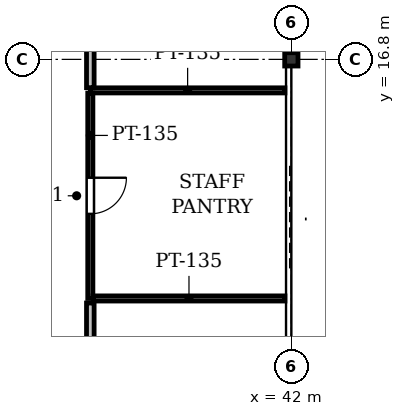
"""IFC4 building model, lengths in metres.
Left out: names, types, materials, properties, quantities, classifications, styles, units other than length and angle.
Written with IfcOpenShell. Run it as: python <this file> out.ifc"""

import sys

from ifc_helpers import new_model, si_unit, direction, frame, frame_2d, origin, origin_2d, place, context, subcontext, project, spatial, rectangle, i_section, extrude, element, fill, save


model = new_model("IFC4")
c1 = context("Model", 3, precision=1e-05, world=origin(), true_north=direction((0.0, 1.0)))
c2 = subcontext(c1, "Body", "Model", "MODEL_VIEW")
j1 = project(units=[si_unit("LENGTHUNIT", "METRE"), si_unit("PLANEANGLEUNIT", "RADIAN")], contexts=[c1])
p1 = place(None, origin())
s1 = spatial("IfcSite", under=j1, at=p1, CompositionType="ELEMENT")
p2 = place(p1, origin())
s2 = spatial("IfcBuilding", under=s1, at=p2, CompositionType="ELEMENT")
p3 = place(p2, frame((0.0, 0.0, 220.6)))
s3 = spatial("IfcBuildingStorey", under=s2, at=p3, CompositionType="ELEMENT", Elevation=220.6)
p4 = place(p3, frame((42.0, 16.8, 0.0), z_axis=(0.0, 0.0, 1.0), x_axis=(1.0, 0.0, 0.0)))
e1 = element("IfcColumn", 1, at=p4, inside=s3, PredefinedType="COLUMN", context=c2, shape_type="SweptSolid", body=[
    extrude(i_section(OverallWidth=0.35, OverallDepth=0.35, WebThickness=0.02, FlangeThickness=0.032, at=origin_2d()), origin(), (0.0, 0.0, 1.0), 4.1),
])
p5 = place(p3, frame((41.831, 15.984, 0.0), z_axis=(0.0, 0.0, 1.0), x_axis=(-1.0, 0.0, 0.0)))
e2 = element("IfcWall", 2, at=p5, inside=s3, PredefinedType="PARTITIONING", context=c2, shape_type="SweptSolid", body=[
    extrude(rectangle(XDim=5.121, YDim=0.135, at=frame_2d((2.561, 0.0))), origin(), (0.0, 0.0, 1.0), 3.518),
])
p6 = place(p3, frame((36.71, 15.913, 0.0), z_axis=(0.0, 0.0, 1.0), x_axis=(0.0, -1.0, 0.0)))
e3 = element("IfcWall", 3, at=p6, inside=s3, PredefinedType="PARTITIONING", context=c2, shape_type="SweptSolid", body=[
    extrude(rectangle(XDim=5.404, YDim=0.135, at=frame_2d((2.702, 0.0))), origin(), (0.0, 0.0, 1.0), 3.825),
])
p7 = place(p6, frame((2.227, 0.0, 0.0)))
e4 = element("IfcOpeningElement", 4, at=p7, cuts=e3, PredefinedType="OPENING", context=c2, shape_type="SweptSolid", body=[
    extrude(rectangle(XDim=0.95, YDim=2.15, at=frame_2d((0.475, 1.075))), frame((0.0, 0.077, 0.0), z_axis=(0.0, -1.0, 0.0), x_axis=(1.0, 0.0, 0.0)), (0.0, 0.0, 1.0), 0.155),
])
p8 = place(p3, frame((36.781, 10.509, 0.0), z_axis=(0.0, 0.0, 1.0), x_axis=(1.0, 0.0, 0.0)))
e5 = element("IfcWall", 5, at=p8, inside=s3, PredefinedType="PARTITIONING", context=c2, shape_type="SweptSolid", body=[
    extrude(rectangle(XDim=5.05, YDim=0.135, at=frame_2d((2.525, 0.0))), origin(), (0.0, 0.0, 1.0), 3.518),
])
p9 = place(p3, frame((36.71, 10.389, 0.0), z_axis=(0.0, 0.0, 1.0), x_axis=(0.0, -1.0, 0.0)))
e6 = element("IfcWall", 6, at=p9, inside=s3, PredefinedType="PARTITIONING", context=c2, shape_type="SweptSolid", body=[
    extrude(rectangle(XDim=4.989, YDim=0.2, at=frame_2d((2.495, 0.0))), origin(), (0.0, 0.0, 1.0), 3.365),
])
p10 = place(p9, frame((1.994, 0.0, 0.0)))
e7 = element("IfcOpeningElement", 7, at=p10, cuts=e6, PredefinedType="OPENING", context=c2, shape_type="SweptSolid", body=[
    extrude(rectangle(XDim=1.0, YDim=2.15, at=frame_2d((0.5, 1.075))), frame((0.0, 0.11, 0.0), z_axis=(0.0, -1.0, 0.0), x_axis=(1.0, 0.0, 0.0)), (0.0, 0.0, 1.0), 0.22),
])
p11 = place(p3, frame((36.71, 19.9, 0.0), z_axis=(0.0, 0.0, 1.0), x_axis=(0.0, -1.0, 0.0)))
e8 = element("IfcWall", 8, at=p11, inside=s3, PredefinedType="PARTITIONING", context=c2, shape_type="SweptSolid", body=[
    extrude(rectangle(XDim=3.844, YDim=0.2, at=frame_2d((1.922, 0.0))), origin(), (0.0, 0.0, 1.0), 3.365),
])
p12 = place(p7, origin())
e9 = element("IfcDoor", 9, at=p12, inside=s3, OperationType="SINGLE_SWING_LEFT", PredefinedType="DOOR", context=c2, shape_type="SweptSolid", body=[
    extrude(rectangle(XDim=0.95, YDim=2.15, at=frame_2d((0.475, 1.075))), frame((0.0, 0.025, 0.0), z_axis=(0.0, -1.0, 0.0), x_axis=(1.0, 0.0, 0.0)), (0.0, 0.0, 1.0), 0.05),
])
fill(e4, e9)
save(model, sys.argv[1])
